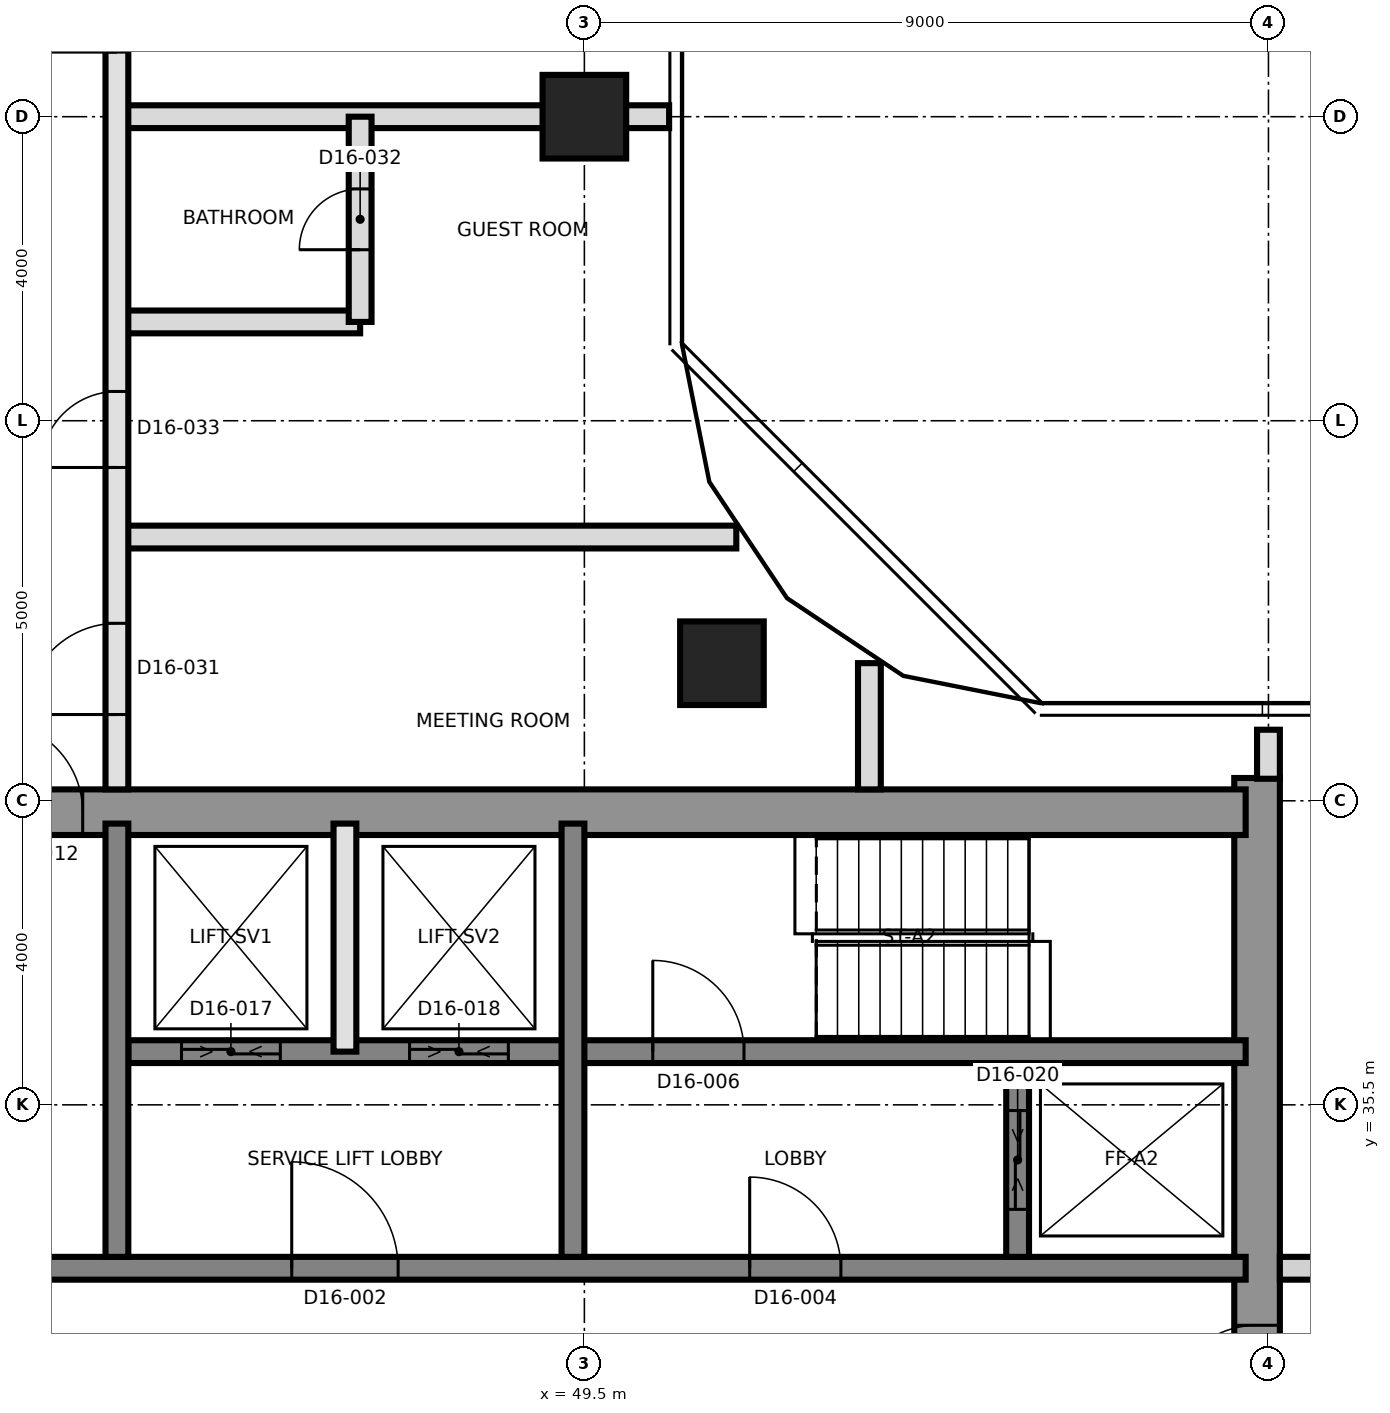
"""IFC4 building model, lengths in metres.
Left out: names, types, materials, properties, quantities, classifications, styles, units other than length and angle.
Written with IfcOpenShell. Run it as: python <this file> out.ifc"""

import sys

from ifc_helpers import new_model, si_unit, direction, frame, frame_2d, origin, origin_2d, place, context, subcontext, project, spatial, rectangle, extrude, element, fill, save


model = new_model("IFC4")
c1 = context("Model", 3, precision=1e-05, world=origin(), true_north=direction((0.0, 1.0)))
c2 = subcontext(c1, "Body", "Model", "MODEL_VIEW")
j1 = project(units=[si_unit("LENGTHUNIT", "METRE"), si_unit("PLANEANGLEUNIT", "RADIAN")], contexts=[c1])
p1 = place(None, origin())
s1 = spatial("IfcSite", under=j1, at=p1, CompositionType="ELEMENT")
p2 = place(p1, origin())
s2 = spatial("IfcBuilding", under=s1, at=p2, CompositionType="ELEMENT")
p3 = place(p2, frame((0.0, 0.0, 164.4)))
s3 = spatial("IfcBuildingStorey", under=s2, at=p3, CompositionType="ELEMENT", Elevation=164.4)
p4 = place(p3, frame((58.35, 21.2, 0.0), z_axis=(0.0, 0.0, 1.0), x_axis=(0.0, 1.0, 0.0)))
e1 = element("IfcWall", 1, at=p4, inside=s3, PredefinedType="SHEAR", context=c2, shape_type="SweptSolid", body=[
    extrude(rectangle(XDim=18.6, YDim=0.6, at=frame_2d((9.3, 0.0))), origin(), (0.0, 0.0, 1.0), 3.7),
])
p5 = place(p4, frame((10.2, 0.0, 0.0)))
e2 = element("IfcOpeningElement", 2, at=p5, cuts=e1, PredefinedType="OPENING", context=c2, shape_type="SweptSolid", body=[
    extrude(rectangle(XDim=1.2, YDim=2.1, at=frame_2d((0.6, 1.05))), frame((0.0, 0.31, 0.0), z_axis=(0.0, -1.0, 0.0), x_axis=(1.0, 0.0, 0.0)), (0.0, 0.0, 1.0), 0.62),
])
p6 = place(p3, frame((31.2, 39.35, 0.0), z_axis=(0.0, 0.0, 1.0), x_axis=(1.0, 0.0, 0.0)))
e3 = element("IfcWall", 3, at=p6, inside=s3, PredefinedType="SHEAR", context=c2, shape_type="SweptSolid", body=[
    extrude(rectangle(XDim=27.0, YDim=0.6, at=frame_2d((13.5, 0.0))), origin(), (0.0, 0.0, 1.0), 3.7),
])
p7 = place(p6, frame((10.5, 0.0, 0.0)))
e4 = element("IfcOpeningElement", 4, at=p7, cuts=e3, PredefinedType="OPENING", context=c2, shape_type="SweptSolid", body=[
    extrude(rectangle(XDim=1.2, YDim=2.1, at=frame_2d((0.6, 1.05))), frame((0.0, 0.31, 0.0), z_axis=(0.0, -1.0, 0.0), x_axis=(1.0, 0.0, 0.0)), (0.0, 0.0, 1.0), 0.62),
])
p8 = place(p3, frame((31.8, 33.35, 0.0), z_axis=(0.0, 0.0, 1.0), x_axis=(1.0, 0.0, 0.0)))
e5 = element("IfcWall", 5, at=p8, inside=s3, PredefinedType="SHEAR", context=c2, shape_type="SweptSolid", body=[
    extrude(rectangle(XDim=26.4, YDim=0.3, at=frame_2d((13.2, 0.0))), origin(), (0.0, 0.0, 1.0), 3.7),
])
p9 = place(p8, frame((13.85, 0.0, 0.0)))
e6 = element("IfcOpeningElement", 6, at=p9, cuts=e5, PredefinedType="OPENING", context=c2, shape_type="SweptSolid", body=[
    extrude(rectangle(XDim=1.4, YDim=2.1, at=frame_2d((0.7, 1.05))), frame((0.0, 0.16, 0.0), z_axis=(0.0, -1.0, 0.0), x_axis=(1.0, 0.0, 0.0)), (0.0, 0.0, 1.0), 0.32),
])
p10 = place(p8, frame((5.325, 0.0, 0.0)))
e7 = element("IfcOpeningElement", 7, at=p10, cuts=e5, PredefinedType="OPENING", context=c2, shape_type="SweptSolid", body=[
    extrude(rectangle(XDim=1.2, YDim=2.1, at=frame_2d((0.6, 1.05))), frame((0.0, 0.16, 0.0), z_axis=(0.0, -1.0, 0.0), x_axis=(1.0, 0.0, 0.0)), (0.0, 0.0, 1.0), 0.32),
])
p11 = place(p8, frame((19.875, 0.0, 0.0)))
e8 = element("IfcOpeningElement", 8, at=p11, cuts=e5, PredefinedType="OPENING", context=c2, shape_type="SweptSolid", body=[
    extrude(rectangle(XDim=1.2, YDim=2.1, at=frame_2d((0.6, 1.05))), frame((0.0, 0.16, 0.0), z_axis=(0.0, -1.0, 0.0), x_axis=(1.0, 0.0, 0.0)), (0.0, 0.0, 1.0), 0.32),
])
p12 = place(p3, frame((43.5, 36.2, 0.0), z_axis=(0.0, 0.0, 1.0), x_axis=(1.0, 0.0, 0.0)))
e9 = element("IfcWall", 9, at=p12, inside=s3, PredefinedType="SHEAR", context=c2, shape_type="SweptSolid", body=[
    extrude(rectangle(XDim=14.7, YDim=0.3, at=frame_2d((7.35, 0.0))), origin(), (0.0, 0.0, 1.0), 3.7),
])
p13 = place(p12, frame((6.9, 0.0, 0.0)))
e10 = element("IfcOpeningElement", 10, at=p13, cuts=e9, PredefinedType="OPENING", context=c2, shape_type="SweptSolid", body=[
    extrude(rectangle(XDim=1.2, YDim=2.1, at=frame_2d((0.6, 1.05))), frame((0.0, 0.16, 0.0), z_axis=(0.0, -1.0, 0.0), x_axis=(1.0, 0.0, 0.0)), (0.0, 0.0, 1.0), 0.32),
])
p14 = place(p12, frame((0.7, 0.0, 0.0)))
e11 = element("IfcOpeningElement", 11, at=p14, cuts=e9, PredefinedType="OPENING", context=c2, shape_type="SweptSolid", body=[
    extrude(rectangle(XDim=1.3, YDim=2.4, at=frame_2d((0.65, 1.2))), frame((0.0, 0.16, 0.0), z_axis=(0.0, -1.0, 0.0), x_axis=(1.0, 0.0, 0.0)), (0.0, 0.0, 1.0), 0.32),
])
p15 = place(p12, frame((3.7, 0.0, 0.0)))
e12 = element("IfcOpeningElement", 12, at=p15, cuts=e9, PredefinedType="OPENING", context=c2, shape_type="SweptSolid", body=[
    extrude(rectangle(XDim=1.3, YDim=2.4, at=frame_2d((0.65, 1.2))), frame((0.0, 0.16, 0.0), z_axis=(0.0, -1.0, 0.0), x_axis=(1.0, 0.0, 0.0)), (0.0, 0.0, 1.0), 0.32),
])
for number, where, z_axis, x_axis in (
    (13, (43.35, 33.5, 0.0), (0.0, 0.0, 1.0), (0.0, 1.0, 0.0)),
    (14, (49.35, 33.5, 0.0), (0.0, 0.0, 1.0), (0.0, 1.0, 0.0)),
):
    element("IfcWall", number, at=place(p3, frame(where, z_axis=z_axis, x_axis=x_axis)), inside=s3, PredefinedType="SHEAR", context=c2, shape_type="SweptSolid", body=[
        extrude(rectangle(XDim=5.7, YDim=0.3, at=frame_2d((2.85, 0.0))), origin(), (0.0, 0.0, 1.0), 3.7),
    ])
p16 = place(p3, frame((55.2, 33.5, 0.0), z_axis=(0.0, 0.0, 1.0), x_axis=(0.0, 1.0, 0.0)))
e15 = element("IfcWall", 15, at=p16, inside=s3, PredefinedType="SHEAR", context=c2, shape_type="SweptSolid", body=[
    extrude(rectangle(XDim=2.55, YDim=0.3, at=frame_2d((1.275, 0.0))), origin(), (0.0, 0.0, 1.0), 3.7),
])
p17 = place(p16, frame((0.625, 0.0, 0.0)))
e16 = element("IfcOpeningElement", 16, at=p17, cuts=e15, PredefinedType="OPENING", context=c2, shape_type="SweptSolid", body=[
    extrude(rectangle(XDim=1.3, YDim=2.4, at=frame_2d((0.65, 1.2))), frame((0.0, 0.16, 0.0), z_axis=(0.0, -1.0, 0.0), x_axis=(1.0, 0.0, 0.0)), (0.0, 0.0, 1.0), 0.32),
])
for number, where, z_axis, x_axis in (
    (17, (51.31, 41.31, 0.0), (0.0, 0.0, 1.0), (1.0, 0.0, 0.0)),
    (18, (49.5, 48.5, 0.0), (0.0, 0.0, 1.0), (1.0, 0.0, 0.0)),
):
    element("IfcColumn", number, at=place(p3, frame(where, z_axis=z_axis, x_axis=x_axis)), inside=s3, PredefinedType="COLUMN", context=c2, shape_type="SweptSolid", body=[
        extrude(rectangle(XDim=1.1, YDim=1.1, at=origin_2d()), origin(), (0.0, 0.0, 1.0), 3.7),
    ])
p18 = place(p3, frame((46.35, 36.2, 0.0), z_axis=(0.0, 0.0, 1.0), x_axis=(0.0, 1.0, 0.0)))
e19 = element("IfcWall", 19, at=p18, inside=s3, PredefinedType="SOLIDWALL", context=c2, shape_type="SweptSolid", body=[
    extrude(rectangle(XDim=3.0, YDim=0.3, at=frame_2d((1.5, 0.0))), origin(), (0.0, 0.0, 1.0), 3.4),
])
p19 = place(p3, frame((58.65, 33.35, 0.0), z_axis=(0.0, 0.0, 1.0), x_axis=(1.0, 0.0, 0.0)))
e20 = element("IfcWall", 20, at=p19, inside=s3, PredefinedType="PARTITIONING", context=c2, shape_type="SweptSolid", body=[
    extrude(rectangle(XDim=8.5, YDim=0.3, at=frame_2d((4.25, 0.0))), origin(), (0.0, 0.0, 1.0), 3.4),
])
p20 = place(p19, frame((2.0, 0.0, 0.0)))
e21 = element("IfcOpeningElement", 21, at=p20, cuts=e20, PredefinedType="OPENING", context=c2, shape_type="SweptSolid", body=[
    extrude(rectangle(XDim=1.0, YDim=2.4, at=frame_2d((0.5, 1.2))), frame((0.0, 0.16, 0.0), z_axis=(0.0, -1.0, 0.0), x_axis=(1.0, 0.0, 0.0)), (0.0, 0.0, 1.0), 0.32),
])
p21 = place(p3, frame((43.35, 42.97, 0.0), z_axis=(0.0, 0.0, 1.0), x_axis=(1.0, 0.0, 0.0)))
e22 = element("IfcWall", 22, at=p21, inside=s3, PredefinedType="PARTITIONING", context=c2, shape_type="SweptSolid", body=[
    extrude(rectangle(XDim=8.149, YDim=0.3, at=frame_2d((4.074, 0.0))), origin(), (0.0, 0.0, 1.0), 3.4),
])
p22 = place(p3, frame((43.35, 45.8, 0.0), z_axis=(0.0, 0.0, 1.0), x_axis=(1.0, 0.0, 0.0)))
e23 = element("IfcWall", 23, at=p22, inside=s3, PredefinedType="PARTITIONING", context=c2, shape_type="SweptSolid", body=[
    extrude(rectangle(XDim=3.2, YDim=0.3, at=frame_2d((1.6, 0.0))), origin(), (0.0, 0.0, 1.0), 3.4),
])
p23 = place(p3, frame((43.35, 48.5, 0.0), z_axis=(0.0, 0.0, 1.0), x_axis=(1.0, 0.0, 0.0)))
e24 = element("IfcWall", 24, at=p23, inside=s3, PredefinedType="PARTITIONING", context=c2, shape_type="SweptSolid", body=[
    extrude(rectangle(XDim=7.265, YDim=0.3, at=frame_2d((3.632, 0.0))), origin(), (0.0, 0.0, 1.0), 3.4),
])
p24 = place(p3, frame((43.35, 39.65, 0.0), z_axis=(0.0, 0.0, 1.0), x_axis=(0.0, 1.0, 0.0)))
e25 = element("IfcWall", 25, at=p24, inside=s3, PredefinedType="SOLIDWALL", context=c2, shape_type="SweptSolid", body=[
    extrude(rectangle(XDim=26.1, YDim=0.3, at=frame_2d((13.05, 0.0))), origin(), (0.0, 0.0, 1.0), 3.4),
])
p25 = place(p24, frame((0.985, 0.0, 0.0)))
e26 = element("IfcOpeningElement", 26, at=p25, cuts=e25, PredefinedType="OPENING", context=c2, shape_type="SweptSolid", body=[
    extrude(rectangle(XDim=1.2, YDim=2.1, at=frame_2d((0.6, 1.05))), frame((0.0, 0.16, 0.0), z_axis=(0.0, -1.0, 0.0), x_axis=(1.0, 0.0, 0.0)), (0.0, 0.0, 1.0), 0.32),
])
p26 = place(p24, frame((4.235, 0.0, 0.0)))
e27 = element("IfcOpeningElement", 27, at=p26, cuts=e25, PredefinedType="OPENING", context=c2, shape_type="SweptSolid", body=[
    extrude(rectangle(XDim=1.0, YDim=2.1, at=frame_2d((0.5, 1.05))), frame((0.0, 0.16, 0.0), z_axis=(0.0, -1.0, 0.0), x_axis=(1.0, 0.0, 0.0)), (0.0, 0.0, 1.0), 0.32),
])
p27 = place(p24, frame((9.7, 0.0, 0.0)))
e28 = element("IfcOpeningElement", 28, at=p27, cuts=e25, PredefinedType="OPENING", context=c2, shape_type="SweptSolid", body=[
    extrude(rectangle(XDim=1.0, YDim=2.1, at=frame_2d((0.5, 1.05))), frame((0.0, 0.16, 0.0), z_axis=(0.0, -1.0, 0.0), x_axis=(1.0, 0.0, 0.0)), (0.0, 0.0, 1.0), 0.32),
])
p28 = place(p24, frame((15.55, 0.0, 0.0)))
e29 = element("IfcOpeningElement", 29, at=p28, cuts=e25, PredefinedType="OPENING", context=c2, shape_type="SweptSolid", body=[
    extrude(rectangle(XDim=1.0, YDim=2.1, at=frame_2d((0.5, 1.05))), frame((0.0, 0.16, 0.0), z_axis=(0.0, -1.0, 0.0), x_axis=(1.0, 0.0, 0.0)), (0.0, 0.0, 1.0), 0.32),
])
p29 = place(p24, frame((19.85, 0.0, 0.0)))
e30 = element("IfcOpeningElement", 30, at=p29, cuts=e25, PredefinedType="OPENING", context=c2, shape_type="SweptSolid", body=[
    extrude(rectangle(XDim=1.0, YDim=2.4, at=frame_2d((0.5, 1.2))), frame((0.0, 0.16, 0.0), z_axis=(0.0, -1.0, 0.0), x_axis=(1.0, 0.0, 0.0)), (0.0, 0.0, 1.0), 0.32),
])
p30 = place(p3, frame((46.55, 45.8, 0.0), z_axis=(0.0, 0.0, 1.0), x_axis=(0.0, 1.0, 0.0)))
e31 = element("IfcWall", 31, at=p30, inside=s3, PredefinedType="PARTITIONING", context=c2, shape_type="SweptSolid", body=[
    extrude(rectangle(XDim=2.7, YDim=0.3, at=frame_2d((1.35, 0.0))), origin(), (0.0, 0.0, 1.0), 3.4),
])
p31 = place(p30, frame((0.95, 0.0, 0.0)))
e32 = element("IfcOpeningElement", 32, at=p31, cuts=e31, PredefinedType="OPENING", context=c2, shape_type="SweptSolid", body=[
    extrude(rectangle(XDim=0.8, YDim=2.1, at=frame_2d((0.4, 1.05))), frame((0.0, 0.16, 0.0), z_axis=(0.0, -1.0, 0.0), x_axis=(1.0, 0.0, 0.0)), (0.0, 0.0, 1.0), 0.32),
])
p32 = place(p3, frame((53.25, 39.65, 0.0), z_axis=(0.0, 0.0, 1.0), x_axis=(0.0, 1.0, 0.0)))
e33 = element("IfcWall", 33, at=p32, inside=s3, PredefinedType="PARTITIONING", context=c2, shape_type="SweptSolid", body=[
    extrude(rectangle(XDim=1.661, YDim=0.3, at=frame_2d((0.831, 0.0))), origin(), (0.0, 0.0, 1.0), 3.4),
])
p33 = place(p3, frame((58.5, 39.79, 0.0), z_axis=(0.0, 0.0, 1.0), x_axis=(0.0, 1.0, 0.0)))
e34 = element("IfcWall", 34, at=p33, inside=s3, PredefinedType="PARTITIONING", context=c2, shape_type="SweptSolid", body=[
    extrude(rectangle(XDim=0.645, YDim=0.3, at=frame_2d((0.323, 0.0))), origin(), (0.0, 0.0, 1.0), 3.4),
])
p34 = place(p9, origin())
e35 = element("IfcDoor", 35, at=p34, inside=s3, OperationType="SINGLE_SWING_RIGHT", PredefinedType="DOOR", context=c2, shape_type="SweptSolid", body=[
    extrude(rectangle(XDim=1.4, YDim=2.1, at=frame_2d((0.7, 1.05))), frame((0.0, 0.025, 0.0), z_axis=(0.0, -1.0, 0.0), x_axis=(1.0, 0.0, 0.0)), (0.0, 0.0, 1.0), 0.05),
])
fill(e6, e35)
p35 = place(p11, origin())
e36 = element("IfcDoor", 36, at=p35, inside=s3, OperationType="SINGLE_SWING_RIGHT", PredefinedType="DOOR", context=c2, shape_type="SweptSolid", body=[
    extrude(rectangle(XDim=1.2, YDim=2.1, at=frame_2d((0.6, 1.05))), frame((0.0, 0.025, 0.0), z_axis=(0.0, -1.0, 0.0), x_axis=(1.0, 0.0, 0.0)), (0.0, 0.0, 1.0), 0.05),
])
fill(e8, e36)
p36 = place(p13, origin())
e37 = element("IfcDoor", 37, at=p36, inside=s3, OperationType="SINGLE_SWING_LEFT", PredefinedType="DOOR", context=c2, shape_type="SweptSolid", body=[
    extrude(rectangle(XDim=1.2, YDim=2.1, at=frame_2d((0.6, 1.05))), frame((0.0, 0.025, 0.0), z_axis=(0.0, -1.0, 0.0), x_axis=(1.0, 0.0, 0.0)), (0.0, 0.0, 1.0), 0.05),
])
fill(e10, e37)
p37 = place(p5, origin())
e38 = element("IfcDoor", 38, at=p37, inside=s3, OperationType="SINGLE_SWING_LEFT", PredefinedType="DOOR", context=c2, shape_type="SweptSolid", body=[
    extrude(rectangle(XDim=1.2, YDim=2.1, at=frame_2d((0.6, 1.05))), frame((0.0, 0.025, 0.0), z_axis=(0.0, -1.0, 0.0), x_axis=(1.0, 0.0, 0.0)), (0.0, 0.0, 1.0), 0.05),
])
fill(e2, e38)
p38 = place(p7, origin())
e39 = element("IfcDoor", 39, at=p38, inside=s3, OperationType="SINGLE_SWING_RIGHT", PredefinedType="DOOR", context=c2, shape_type="SweptSolid", body=[
    extrude(rectangle(XDim=1.2, YDim=2.1, at=frame_2d((0.6, 1.05))), frame((0.0, 0.025, 0.0), z_axis=(0.0, -1.0, 0.0), x_axis=(1.0, 0.0, 0.0)), (0.0, 0.0, 1.0), 0.05),
])
fill(e4, e39)
p39 = place(p14, origin())
e40 = element("IfcDoor", 40, at=p39, inside=s3, OperationType="SLIDING_TO_LEFT", PredefinedType="DOOR", context=c2, shape_type="SweptSolid", body=[
    extrude(rectangle(XDim=1.3, YDim=2.4, at=frame_2d((0.65, 1.2))), frame((0.0, 0.025, 0.0), z_axis=(0.0, -1.0, 0.0), x_axis=(1.0, 0.0, 0.0)), (0.0, 0.0, 1.0), 0.05),
])
fill(e11, e40)
p40 = place(p15, origin())
e41 = element("IfcDoor", 41, at=p40, inside=s3, OperationType="SLIDING_TO_LEFT", PredefinedType="DOOR", context=c2, shape_type="SweptSolid", body=[
    extrude(rectangle(XDim=1.3, YDim=2.4, at=frame_2d((0.65, 1.2))), frame((0.0, 0.025, 0.0), z_axis=(0.0, -1.0, 0.0), x_axis=(1.0, 0.0, 0.0)), (0.0, 0.0, 1.0), 0.05),
])
fill(e12, e41)
p41 = place(p17, origin())
e42 = element("IfcDoor", 42, at=p41, inside=s3, OperationType="SLIDING_TO_LEFT", PredefinedType="DOOR", context=c2, shape_type="SweptSolid", body=[
    extrude(rectangle(XDim=1.3, YDim=2.4, at=frame_2d((0.65, 1.2))), frame((0.0, 0.025, 0.0), z_axis=(0.0, -1.0, 0.0), x_axis=(1.0, 0.0, 0.0)), (0.0, 0.0, 1.0), 0.05),
])
fill(e16, e42)
p42 = place(p25, origin())
e43 = element("IfcDoor", 43, at=p42, inside=s3, OperationType="SINGLE_SWING_RIGHT", PredefinedType="DOOR", context=c2, shape_type="SweptSolid", body=[
    extrude(rectangle(XDim=1.2, YDim=2.1, at=frame_2d((0.6, 1.05))), frame((0.0, 0.025, 0.0), z_axis=(0.0, -1.0, 0.0), x_axis=(1.0, 0.0, 0.0)), (0.0, 0.0, 1.0), 0.05),
])
fill(e26, e43)
p43 = place(p31, origin())
e44 = element("IfcDoor", 44, at=p43, inside=s3, OperationType="SINGLE_SWING_LEFT", PredefinedType="DOOR", context=c2, shape_type="SweptSolid", body=[
    extrude(rectangle(XDim=0.8, YDim=2.1, at=frame_2d((0.4, 1.05))), frame((0.0, 0.025, 0.0), z_axis=(0.0, -1.0, 0.0), x_axis=(1.0, 0.0, 0.0)), (0.0, 0.0, 1.0), 0.05),
])
fill(e32, e44)
p44 = place(p26, origin())
e45 = element("IfcDoor", 45, at=p44, inside=s3, OperationType="SINGLE_SWING_LEFT", PredefinedType="DOOR", context=c2, shape_type="SweptSolid", body=[
    extrude(rectangle(XDim=1.0, YDim=2.1, at=frame_2d((0.5, 1.05))), frame((0.0, 0.025, 0.0), z_axis=(0.0, -1.0, 0.0), x_axis=(1.0, 0.0, 0.0)), (0.0, 0.0, 1.0), 0.05),
])
fill(e27, e45)
p45 = place(p27, origin())
e46 = element("IfcDoor", 46, at=p45, inside=s3, OperationType="SINGLE_SWING_RIGHT", PredefinedType="DOOR", context=c2, shape_type="SweptSolid", body=[
    extrude(rectangle(XDim=1.0, YDim=2.1, at=frame_2d((0.5, 1.05))), frame((0.0, 0.025, 0.0), z_axis=(0.0, -1.0, 0.0), x_axis=(1.0, 0.0, 0.0)), (0.0, 0.0, 1.0), 0.05),
])
fill(e28, e46)
save(model, sys.argv[1])
